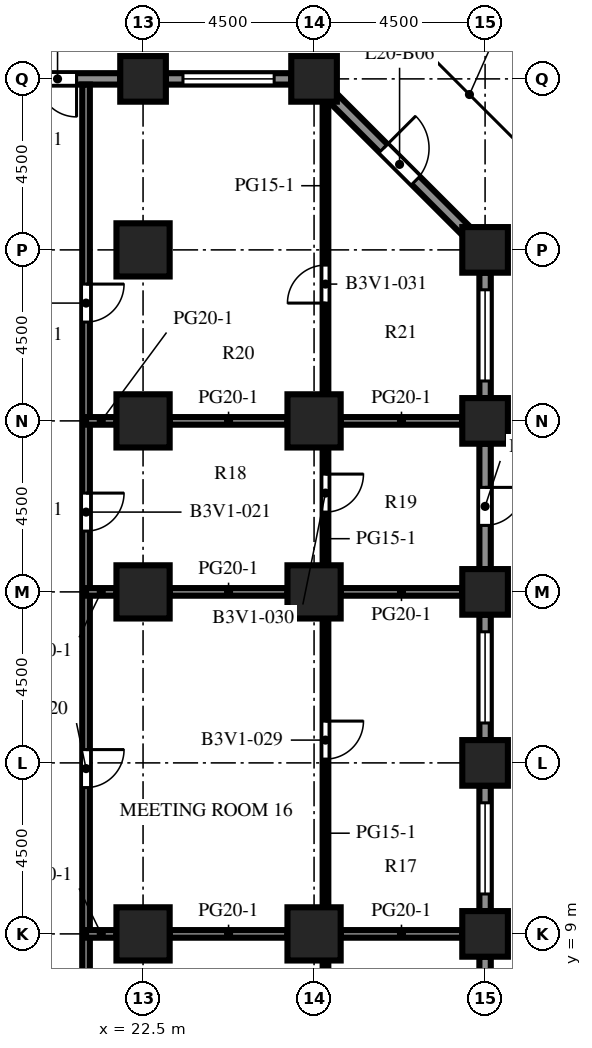
"""IFC4 building model, lengths in metres.
Left out: names, types, materials, properties, quantities, classifications, styles, units other than length and angle.
Written with IfcOpenShell. Run it as: python <this file> out.ifc"""

import sys

from ifc_helpers import new_model, si_unit, direction, frame, frame_2d, origin, origin_2d, place, context, subcontext, project, spatial, rectangle, extrude, element, fill, save


model = new_model("IFC4")
c1 = context("Model", 3, precision=1e-05, world=origin(), true_north=direction((0.0, 1.0)))
c2 = subcontext(c1, "Body", "Model", "MODEL_VIEW")
j1 = project(units=[si_unit("LENGTHUNIT", "METRE"), si_unit("PLANEANGLEUNIT", "RADIAN")], contexts=[c1])
p1 = place(None, origin())
s1 = spatial("IfcSite", under=j1, at=p1, CompositionType="ELEMENT")
p2 = place(p1, origin())
s2 = spatial("IfcBuilding", under=s1, at=p2, CompositionType="ELEMENT")
p3 = place(p2, frame((0.0, 0.0, 90.2)))
s3 = spatial("IfcBuildingStorey", under=s2, at=p3, CompositionType="ELEMENT", Elevation=90.2)
for number, where, z_axis, x_axis in (
    (1, (22.5, 31.5, 0.0), (0.0, 0.0, 1.0), (1.0, 0.0, 0.0)),
    (2, (27.0, 31.5, 0.0), (0.0, 0.0, 1.0), (1.0, 0.0, 0.0)),
    (3, (31.5, 9.0, 0.0), (0.0, 0.0, 1.0), (1.0, 0.0, 0.0)),
    (4, (31.5, 13.5, 0.0), (0.0, 0.0, 1.0), (1.0, 0.0, 0.0)),
    (5, (31.5, 18.0, 0.0), (0.0, 0.0, 1.0), (1.0, 0.0, 0.0)),
    (6, (31.5, 22.5, 0.0), (0.0, 0.0, 1.0), (1.0, 0.0, 0.0)),
    (7, (31.5, 27.0, 0.0), (0.0, 0.0, 1.0), (1.0, 0.0, 0.0)),
):
    element("IfcColumn", number, at=place(p3, frame(where, z_axis=z_axis, x_axis=x_axis)), inside=s3, PredefinedType="COLUMN", context=c2, shape_type="SweptSolid", body=[
        extrude(rectangle(XDim=1.2, YDim=1.2, at=origin_2d()), origin(), (0.0, 0.0, 1.0), 4.1),
    ])
for number, where, z_axis, x_axis in (
    (8, (22.5, 9.0, 0.0), (0.0, 0.0, 1.0), (1.0, 0.0, 0.0)),
    (9, (22.5, 18.0, 0.0), (0.0, 0.0, 1.0), (1.0, 0.0, 0.0)),
    (10, (22.5, 22.5, 0.0), (0.0, 0.0, 1.0), (1.0, 0.0, 0.0)),
    (11, (22.5, 27.0, 0.0), (0.0, 0.0, 1.0), (1.0, 0.0, 0.0)),
    (12, (27.0, 9.0, 0.0), (0.0, 0.0, 1.0), (1.0, 0.0, 0.0)),
    (13, (27.0, 18.0, 0.0), (0.0, 0.0, 1.0), (1.0, 0.0, 0.0)),
    (14, (27.0, 22.5, 0.0), (0.0, 0.0, 1.0), (1.0, 0.0, 0.0)),
):
    element("IfcColumn", number, at=place(p3, frame(where, z_axis=z_axis, x_axis=x_axis)), inside=s3, PredefinedType="COLUMN", context=c2, shape_type="SweptSolid", body=[
        extrude(rectangle(XDim=1.4, YDim=1.4, at=origin_2d()), origin(), (0.0, 0.0, 1.0), 4.1),
    ])
p4 = place(p3, frame((31.5, 8.4, 0.0), z_axis=(0.0, 0.0, 1.0), x_axis=(0.0, -1.0, 0.0)))
e15 = element("IfcWall", 15, at=p4, inside=s3, PredefinedType="SOLIDWALL", context=c2, shape_type="SweptSolid", body=[
    extrude(rectangle(XDim=3.3, YDim=0.3, at=frame_2d((1.65, 0.0))), origin(), (0.0, 0.0, 1.0), 2.75),
])
p5 = place(p4, frame((0.45, 0.0, 0.8)))
e16 = element("IfcOpeningElement", 16, at=p5, cuts=e15, PredefinedType="OPENING", context=c2, shape_type="SweptSolid", body=[
    extrude(rectangle(XDim=2.4, YDim=1.7, at=frame_2d((1.2, 0.85))), frame((0.0, 0.16, 0.0), z_axis=(0.0, -1.0, 0.0), x_axis=(1.0, 0.0, 0.0)), (0.0, 0.0, 1.0), 0.32),
])
p6 = place(p3, frame((31.5, 12.9, 0.0), z_axis=(0.0, 0.0, 1.0), x_axis=(0.0, -1.0, 0.0)))
e17 = element("IfcWall", 17, at=p6, inside=s3, PredefinedType="SOLIDWALL", context=c2, shape_type="SweptSolid", body=[
    extrude(rectangle(XDim=3.3, YDim=0.3, at=frame_2d((1.65, 0.0))), origin(), (0.0, 0.0, 1.0), 2.75),
])
p7 = place(p6, frame((0.45, 0.0, 0.8)))
e18 = element("IfcOpeningElement", 18, at=p7, cuts=e17, PredefinedType="OPENING", context=c2, shape_type="SweptSolid", body=[
    extrude(rectangle(XDim=2.4, YDim=1.7, at=frame_2d((1.2, 0.85))), frame((0.0, 0.16, 0.0), z_axis=(0.0, -1.0, 0.0), x_axis=(1.0, 0.0, 0.0)), (0.0, 0.0, 1.0), 0.32),
])
p8 = place(p3, frame((31.5, 17.4, 0.0), z_axis=(0.0, 0.0, 1.0), x_axis=(0.0, -1.0, 0.0)))
e19 = element("IfcWall", 19, at=p8, inside=s3, PredefinedType="SOLIDWALL", context=c2, shape_type="SweptSolid", body=[
    extrude(rectangle(XDim=3.3, YDim=0.3, at=frame_2d((1.65, 0.0))), origin(), (0.0, 0.0, 1.0), 2.75),
])
p9 = place(p8, frame((0.45, 0.0, 0.8)))
e20 = element("IfcOpeningElement", 20, at=p9, cuts=e19, PredefinedType="OPENING", context=c2, shape_type="SweptSolid", body=[
    extrude(rectangle(XDim=2.4, YDim=1.7, at=frame_2d((1.2, 0.85))), frame((0.0, 0.16, 0.0), z_axis=(0.0, -1.0, 0.0), x_axis=(1.0, 0.0, 0.0)), (0.0, 0.0, 1.0), 0.32),
])
p10 = place(p3, frame((31.5, 21.9, 0.0), z_axis=(0.0, 0.0, 1.0), x_axis=(0.0, -1.0, 0.0)))
e21 = element("IfcWall", 21, at=p10, inside=s3, PredefinedType="SOLIDWALL", context=c2, shape_type="SweptSolid", body=[
    extrude(rectangle(XDim=3.3, YDim=0.3, at=frame_2d((1.65, 0.0))), origin(), (0.0, 0.0, 1.0), 2.75),
])
p11 = place(p10, frame((1.15, 0.0, 0.0)))
e22 = element("IfcOpeningElement", 22, at=p11, cuts=e21, PredefinedType="OPENING", context=c2, shape_type="SweptSolid", body=[
    extrude(rectangle(XDim=1.0, YDim=2.2, at=frame_2d((0.5, 1.1))), frame((0.0, 0.16, 0.0), z_axis=(0.0, -1.0, 0.0), x_axis=(1.0, 0.0, 0.0)), (0.0, 0.0, 1.0), 0.32),
])
p12 = place(p3, frame((31.5, 26.4, 0.0), z_axis=(0.0, 0.0, 1.0), x_axis=(0.0, -1.0, 0.0)))
e23 = element("IfcWall", 23, at=p12, inside=s3, PredefinedType="SOLIDWALL", context=c2, shape_type="SweptSolid", body=[
    extrude(rectangle(XDim=3.3, YDim=0.3, at=frame_2d((1.65, 0.0))), origin(), (0.0, 0.0, 1.0), 2.75),
])
p13 = place(p12, frame((0.45, 0.0, 0.8)))
e24 = element("IfcOpeningElement", 24, at=p13, cuts=e23, PredefinedType="OPENING", context=c2, shape_type="SweptSolid", body=[
    extrude(rectangle(XDim=2.4, YDim=1.7, at=frame_2d((1.2, 0.85))), frame((0.0, 0.16, 0.0), z_axis=(0.0, -1.0, 0.0), x_axis=(1.0, 0.0, 0.0)), (0.0, 0.0, 1.0), 0.32),
])
p14 = place(p3, frame((27.494, 31.006, 0.0), z_axis=(0.0, 0.0, 1.0), x_axis=(0.707106781187, -0.707106781187, 0.0)))
e25 = element("IfcWall", 25, at=p14, inside=s3, PredefinedType="SOLIDWALL", context=c2, shape_type="SweptSolid", body=[
    extrude(rectangle(XDim=4.967, YDim=0.3, at=frame_2d((2.483, 0.0))), origin(), (0.0, 0.0, 1.0), 2.75),
])
p15 = place(p14, frame((1.884, 0.0, 0.0)))
e26 = element("IfcOpeningElement", 26, at=p15, cuts=e25, PredefinedType="OPENING", context=c2, shape_type="SweptSolid", body=[
    extrude(rectangle(XDim=1.2, YDim=2.2, at=frame_2d((0.6, 1.1))), frame((0.0, 0.16, 0.0), z_axis=(0.0, -1.0, 0.0), x_axis=(1.0, 0.0, 0.0)), (0.0, 0.0, 1.0), 0.32),
])
p16 = place(p3, frame((23.1, 31.5, 0.0), z_axis=(0.0, 0.0, 1.0), x_axis=(1.0, 0.0, 0.0)))
e27 = element("IfcWall", 27, at=p16, inside=s3, PredefinedType="SOLIDWALL", context=c2, shape_type="SweptSolid", body=[
    extrude(rectangle(XDim=3.3, YDim=0.3, at=frame_2d((1.65, 0.0))), origin(), (0.0, 0.0, 1.0), 2.75),
])
p17 = place(p16, frame((0.45, 0.0, 0.8)))
e28 = element("IfcOpeningElement", 28, at=p17, cuts=e27, PredefinedType="OPENING", context=c2, shape_type="SweptSolid", body=[
    extrude(rectangle(XDim=2.4, YDim=1.7, at=frame_2d((1.2, 0.85))), frame((0.0, 0.16, 0.0), z_axis=(0.0, -1.0, 0.0), x_axis=(1.0, 0.0, 0.0)), (0.0, 0.0, 1.0), 0.32),
])
p18 = place(p3, frame((18.6, 31.5, 0.0), z_axis=(0.0, 0.0, 1.0), x_axis=(1.0, 0.0, 0.0)))
e29 = element("IfcWall", 29, at=p18, inside=s3, PredefinedType="SOLIDWALL", context=c2, shape_type="SweptSolid", body=[
    extrude(rectangle(XDim=3.3, YDim=0.3, at=frame_2d((1.65, 0.0))), origin(), (0.0, 0.0, 1.0), 2.75),
])
p19 = place(p18, frame((1.15, 0.0, 0.0)))
e30 = element("IfcOpeningElement", 30, at=p19, cuts=e29, PredefinedType="OPENING", context=c2, shape_type="SweptSolid", body=[
    extrude(rectangle(XDim=1.0, YDim=2.2, at=frame_2d((0.5, 1.1))), frame((0.0, 0.16, 0.0), z_axis=(0.0, -1.0, 0.0), x_axis=(1.0, 0.0, 0.0)), (0.0, 0.0, 1.0), 0.32),
])
p20 = place(p3, frame((21.0, 31.35, 0.0), z_axis=(0.0, 0.0, 1.0), x_axis=(0.0, -1.0, 0.0)))
e31 = element("IfcWall", 31, at=p20, inside=s3, PredefinedType="PARTITIONING", context=c2, shape_type="SweptSolid", body=[
    extrude(rectangle(XDim=53.7, YDim=0.2, at=frame_2d((26.85, 0.0))), origin(), (0.0, 0.0, 1.0), 3.65),
])
p21 = place(p20, frame((47.5, 0.0, 0.0)))
e32 = element("IfcOpeningElement", 32, at=p21, cuts=e31, PredefinedType="OPENING", context=c2, shape_type="SweptSolid", body=[
    extrude(rectangle(XDim=1.0, YDim=2.1, at=frame_2d((0.5, 1.05))), frame((0.0, 0.11, 0.0), z_axis=(0.0, -1.0, 0.0), x_axis=(1.0, 0.0, 0.0)), (0.0, 0.0, 1.0), 0.22),
])
p22 = place(p20, frame((37.5, 0.0, 0.0)))
e33 = element("IfcOpeningElement", 33, at=p22, cuts=e31, PredefinedType="OPENING", context=c2, shape_type="SweptSolid", body=[
    extrude(rectangle(XDim=1.0, YDim=2.1, at=frame_2d((0.5, 1.05))), frame((0.0, 0.11, 0.0), z_axis=(0.0, -1.0, 0.0), x_axis=(1.0, 0.0, 0.0)), (0.0, 0.0, 1.0), 0.22),
])
p23 = place(p20, frame((27.25, 0.0, 0.0)))
e34 = element("IfcOpeningElement", 34, at=p23, cuts=e31, PredefinedType="OPENING", context=c2, shape_type="SweptSolid", body=[
    extrude(rectangle(XDim=1.0, YDim=2.1, at=frame_2d((0.5, 1.05))), frame((0.0, 0.11, 0.0), z_axis=(0.0, -1.0, 0.0), x_axis=(1.0, 0.0, 0.0)), (0.0, 0.0, 1.0), 0.22),
])
p24 = place(p20, frame((17.5, 0.0, 0.0)))
e35 = element("IfcOpeningElement", 35, at=p24, cuts=e31, PredefinedType="OPENING", context=c2, shape_type="SweptSolid", body=[
    extrude(rectangle(XDim=1.0, YDim=2.1, at=frame_2d((0.5, 1.05))), frame((0.0, 0.11, 0.0), z_axis=(0.0, -1.0, 0.0), x_axis=(1.0, 0.0, 0.0)), (0.0, 0.0, 1.0), 0.22),
])
p25 = place(p20, frame((10.75, 0.0, 0.0)))
e36 = element("IfcOpeningElement", 36, at=p25, cuts=e31, PredefinedType="OPENING", context=c2, shape_type="SweptSolid", body=[
    extrude(rectangle(XDim=1.0, YDim=2.1, at=frame_2d((0.5, 1.05))), frame((0.0, 0.11, 0.0), z_axis=(0.0, -1.0, 0.0), x_axis=(1.0, 0.0, 0.0)), (0.0, 0.0, 1.0), 0.22),
])
p26 = place(p20, frame((5.25, 0.0, 0.0)))
e37 = element("IfcOpeningElement", 37, at=p26, cuts=e31, PredefinedType="OPENING", context=c2, shape_type="SweptSolid", body=[
    extrude(rectangle(XDim=1.0, YDim=2.1, at=frame_2d((0.5, 1.05))), frame((0.0, 0.11, 0.0), z_axis=(0.0, -1.0, 0.0), x_axis=(1.0, 0.0, 0.0)), (0.0, 0.0, 1.0), 0.22),
])
p27 = place(p3, frame((27.3, 8.3, 0.0), z_axis=(0.0, 0.0, 1.0), x_axis=(0.0, -1.0, 0.0)))
e38 = element("IfcWall", 38, at=p27, inside=s3, PredefinedType="PARTITIONING", context=c2, shape_type="SweptSolid", body=[
    extrude(rectangle(XDim=7.6, YDim=0.15, at=frame_2d((3.8, 0.0))), origin(), (0.0, 0.0, 1.0), 3.65),
])
p28 = place(p27, frame((2.7, 0.0, 0.0)))
e39 = element("IfcOpeningElement", 39, at=p28, cuts=e38, PredefinedType="OPENING", context=c2, shape_type="SweptSolid", body=[
    extrude(rectangle(XDim=1.0, YDim=2.1, at=frame_2d((0.5, 1.05))), frame((0.0, 0.085, 0.0), z_axis=(0.0, -1.0, 0.0), x_axis=(1.0, 0.0, 0.0)), (0.0, 0.0, 1.0), 0.17),
])
p29 = place(p3, frame((27.3, 17.3, 0.0), z_axis=(0.0, 0.0, 1.0), x_axis=(0.0, -1.0, 0.0)))
e40 = element("IfcWall", 40, at=p29, inside=s3, PredefinedType="PARTITIONING", context=c2, shape_type="SweptSolid", body=[
    extrude(rectangle(XDim=7.6, YDim=0.15, at=frame_2d((3.8, 0.0))), origin(), (0.0, 0.0, 1.0), 3.65),
])
p30 = place(p29, frame((2.7, 0.0, 0.0)))
e41 = element("IfcOpeningElement", 41, at=p30, cuts=e40, PredefinedType="OPENING", context=c2, shape_type="SweptSolid", body=[
    extrude(rectangle(XDim=1.0, YDim=2.1, at=frame_2d((0.5, 1.05))), frame((0.0, 0.085, 0.0), z_axis=(0.0, -1.0, 0.0), x_axis=(1.0, 0.0, 0.0)), (0.0, 0.0, 1.0), 0.17),
])
p31 = place(p3, frame((27.3, 21.8, 0.0), z_axis=(0.0, 0.0, 1.0), x_axis=(0.0, -1.0, 0.0)))
e42 = element("IfcWall", 42, at=p31, inside=s3, PredefinedType="PARTITIONING", context=c2, shape_type="SweptSolid", body=[
    extrude(rectangle(XDim=3.1, YDim=0.15, at=frame_2d((1.55, 0.0))), origin(), (0.0, 0.0, 1.0), 3.65),
])
p32 = place(p31, frame((0.7, 0.0, 0.0)))
e43 = element("IfcOpeningElement", 43, at=p32, cuts=e42, PredefinedType="OPENING", context=c2, shape_type="SweptSolid", body=[
    extrude(rectangle(XDim=1.0, YDim=2.1, at=frame_2d((0.5, 1.05))), frame((0.0, 0.085, 0.0), z_axis=(0.0, -1.0, 0.0), x_axis=(1.0, 0.0, 0.0)), (0.0, 0.0, 1.0), 0.17),
])
p33 = place(p3, frame((27.3, 30.777, 0.0), z_axis=(0.0, 0.0, 1.0), x_axis=(0.0, -1.0, 0.0)))
e44 = element("IfcWall", 44, at=p33, inside=s3, PredefinedType="PARTITIONING", context=c2, shape_type="SweptSolid", body=[
    extrude(rectangle(XDim=7.577, YDim=0.15, at=frame_2d((3.789, 0.0))), origin(), (0.0, 0.0, 1.0), 3.65),
])
p34 = place(p33, frame((4.177, 0.0, 0.0)))
e45 = element("IfcOpeningElement", 45, at=p34, cuts=e44, PredefinedType="OPENING", context=c2, shape_type="SweptSolid", body=[
    extrude(rectangle(XDim=1.0, YDim=2.1, at=frame_2d((0.5, 1.05))), frame((0.0, 0.085, 0.0), z_axis=(0.0, -1.0, 0.0), x_axis=(1.0, 0.0, 0.0)), (0.0, 0.0, 1.0), 0.17),
])
p35 = place(p3, frame((21.0, 9.0, 0.0), z_axis=(0.0, 0.0, 1.0), x_axis=(1.0, 0.0, 0.0)))
e46 = element("IfcWall", 46, at=p35, inside=s3, PredefinedType="PARTITIONING", context=c2, shape_type="SweptSolid", body=[
    extrude(rectangle(XDim=0.8, YDim=0.2, at=frame_2d((0.4, 0.0))), origin(), (0.0, 0.0, 1.0), 3.65),
])
p36 = place(p3, frame((23.2, 9.0, 0.0), z_axis=(0.0, 0.0, 1.0), x_axis=(1.0, 0.0, 0.0)))
e47 = element("IfcWall", 47, at=p36, inside=s3, PredefinedType="PARTITIONING", context=c2, shape_type="SweptSolid", body=[
    extrude(rectangle(XDim=3.1, YDim=0.2, at=frame_2d((1.55, 0.0))), origin(), (0.0, 0.0, 1.0), 3.65),
])
p37 = place(p3, frame((27.7, 9.0, 0.0), z_axis=(0.0, 0.0, 1.0), x_axis=(1.0, 0.0, 0.0)))
e48 = element("IfcWall", 48, at=p37, inside=s3, PredefinedType="PARTITIONING", context=c2, shape_type="SweptSolid", body=[
    extrude(rectangle(XDim=3.2, YDim=0.2, at=frame_2d((1.6, 0.0))), origin(), (0.0, 0.0, 1.0), 3.65),
])
p38 = place(p3, frame((21.0, 18.0, 0.0), z_axis=(0.0, 0.0, 1.0), x_axis=(1.0, 0.0, 0.0)))
e49 = element("IfcWall", 49, at=p38, inside=s3, PredefinedType="PARTITIONING", context=c2, shape_type="SweptSolid", body=[
    extrude(rectangle(XDim=0.8, YDim=0.2, at=frame_2d((0.4, 0.0))), origin(), (0.0, 0.0, 1.0), 3.65),
])
p39 = place(p3, frame((23.2, 18.0, 0.0), z_axis=(0.0, 0.0, 1.0), x_axis=(1.0, 0.0, 0.0)))
e50 = element("IfcWall", 50, at=p39, inside=s3, PredefinedType="PARTITIONING", context=c2, shape_type="SweptSolid", body=[
    extrude(rectangle(XDim=3.1, YDim=0.2, at=frame_2d((1.55, 0.0))), origin(), (0.0, 0.0, 1.0), 3.65),
])
p40 = place(p3, frame((27.7, 18.0, 0.0), z_axis=(0.0, 0.0, 1.0), x_axis=(1.0, 0.0, 0.0)))
e51 = element("IfcWall", 51, at=p40, inside=s3, PredefinedType="PARTITIONING", context=c2, shape_type="SweptSolid", body=[
    extrude(rectangle(XDim=3.2, YDim=0.2, at=frame_2d((1.6, 0.0))), origin(), (0.0, 0.0, 1.0), 3.65),
])
p41 = place(p3, frame((21.0, 22.5, 0.0), z_axis=(0.0, 0.0, 1.0), x_axis=(1.0, 0.0, 0.0)))
e52 = element("IfcWall", 52, at=p41, inside=s3, PredefinedType="PARTITIONING", context=c2, shape_type="SweptSolid", body=[
    extrude(rectangle(XDim=0.8, YDim=0.2, at=frame_2d((0.4, 0.0))), origin(), (0.0, 0.0, 1.0), 3.65),
])
p42 = place(p3, frame((23.2, 22.5, 0.0), z_axis=(0.0, 0.0, 1.0), x_axis=(1.0, 0.0, 0.0)))
e53 = element("IfcWall", 53, at=p42, inside=s3, PredefinedType="PARTITIONING", context=c2, shape_type="SweptSolid", body=[
    extrude(rectangle(XDim=3.1, YDim=0.2, at=frame_2d((1.55, 0.0))), origin(), (0.0, 0.0, 1.0), 3.65),
])
p43 = place(p3, frame((27.7, 22.5, 0.0), z_axis=(0.0, 0.0, 1.0), x_axis=(1.0, 0.0, 0.0)))
e54 = element("IfcWall", 54, at=p43, inside=s3, PredefinedType="PARTITIONING", context=c2, shape_type="SweptSolid", body=[
    extrude(rectangle(XDim=3.2, YDim=0.2, at=frame_2d((1.6, 0.0))), origin(), (0.0, 0.0, 1.0), 3.65),
])
p44 = place(p7, origin())
e55 = element("IfcWindow", 55, at=p44, inside=s3, PartitioningType="SINGLE_PANEL", PredefinedType="WINDOW", context=c2, shape_type="SweptSolid", body=[
    extrude(rectangle(XDim=2.4, YDim=1.7, at=frame_2d((1.2, 0.85))), frame((0.0, 0.03, 0.0), z_axis=(0.0, -1.0, 0.0), x_axis=(1.0, 0.0, 0.0)), (0.0, 0.0, 1.0), 0.06),
])
fill(e18, e55)
p45 = place(p9, origin())
e56 = element("IfcWindow", 56, at=p45, inside=s3, PartitioningType="SINGLE_PANEL", PredefinedType="WINDOW", context=c2, shape_type="SweptSolid", body=[
    extrude(rectangle(XDim=2.4, YDim=1.7, at=frame_2d((1.2, 0.85))), frame((0.0, 0.03, 0.0), z_axis=(0.0, -1.0, 0.0), x_axis=(1.0, 0.0, 0.0)), (0.0, 0.0, 1.0), 0.06),
])
fill(e20, e56)
p46 = place(p11, origin())
e57 = element("IfcDoor", 57, at=p46, inside=s3, OperationType="SINGLE_SWING_LEFT", PredefinedType="DOOR", context=c2, shape_type="SweptSolid", body=[
    extrude(rectangle(XDim=1.0, YDim=2.2, at=frame_2d((0.5, 1.1))), frame((0.0, 0.025, 0.0), z_axis=(0.0, -1.0, 0.0), x_axis=(1.0, 0.0, 0.0)), (0.0, 0.0, 1.0), 0.05),
])
fill(e22, e57)
p47 = place(p13, origin())
e58 = element("IfcWindow", 58, at=p47, inside=s3, PartitioningType="SINGLE_PANEL", PredefinedType="WINDOW", context=c2, shape_type="SweptSolid", body=[
    extrude(rectangle(XDim=2.4, YDim=1.7, at=frame_2d((1.2, 0.85))), frame((0.0, 0.03, 0.0), z_axis=(0.0, -1.0, 0.0), x_axis=(1.0, 0.0, 0.0)), (0.0, 0.0, 1.0), 0.06),
])
fill(e24, e58)
p48 = place(p15, origin())
e59 = element("IfcDoor", 59, at=p48, inside=s3, OperationType="SINGLE_SWING_LEFT", PredefinedType="DOOR", context=c2, shape_type="SweptSolid", body=[
    extrude(rectangle(XDim=1.2, YDim=2.2, at=frame_2d((0.6, 1.1))), frame((0.0, 0.025, 0.0), z_axis=(0.0, -1.0, 0.0), x_axis=(1.0, 0.0, 0.0)), (0.0, 0.0, 1.0), 0.05),
])
fill(e26, e59)
p49 = place(p17, origin())
e60 = element("IfcWindow", 60, at=p49, inside=s3, PartitioningType="SINGLE_PANEL", PredefinedType="WINDOW", context=c2, shape_type="SweptSolid", body=[
    extrude(rectangle(XDim=2.4, YDim=1.7, at=frame_2d((1.2, 0.85))), frame((0.0, 0.03, 0.0), z_axis=(0.0, -1.0, 0.0), x_axis=(1.0, 0.0, 0.0)), (0.0, 0.0, 1.0), 0.06),
])
fill(e28, e60)
p50 = place(p19, origin())
e61 = element("IfcDoor", 61, at=p50, inside=s3, OperationType="SINGLE_SWING_RIGHT", PredefinedType="DOOR", context=c2, shape_type="SweptSolid", body=[
    extrude(rectangle(XDim=1.0, YDim=2.2, at=frame_2d((0.5, 1.1))), frame((0.0, 0.025, 0.0), z_axis=(0.0, -1.0, 0.0), x_axis=(1.0, 0.0, 0.0)), (0.0, 0.0, 1.0), 0.05),
])
fill(e30, e61)
p51 = place(p24, origin())
e62 = element("IfcDoor", 62, at=p51, inside=s3, OperationType="SINGLE_SWING_LEFT", PredefinedType="DOOR", context=c2, shape_type="SweptSolid", body=[
    extrude(rectangle(XDim=1.0, YDim=2.1, at=frame_2d((0.5, 1.05))), frame((0.0, 0.025, 0.0), z_axis=(0.0, -1.0, 0.0), x_axis=(1.0, 0.0, 0.0)), (0.0, 0.0, 1.0), 0.05),
])
fill(e35, e62)
p52 = place(p25, origin())
e63 = element("IfcDoor", 63, at=p52, inside=s3, OperationType="SINGLE_SWING_LEFT", PredefinedType="DOOR", context=c2, shape_type="SweptSolid", body=[
    extrude(rectangle(XDim=1.0, YDim=2.1, at=frame_2d((0.5, 1.05))), frame((0.0, 0.025, 0.0), z_axis=(0.0, -1.0, 0.0), x_axis=(1.0, 0.0, 0.0)), (0.0, 0.0, 1.0), 0.05),
])
fill(e36, e63)
p53 = place(p26, origin())
e64 = element("IfcDoor", 64, at=p53, inside=s3, OperationType="SINGLE_SWING_LEFT", PredefinedType="DOOR", context=c2, shape_type="SweptSolid", body=[
    extrude(rectangle(XDim=1.0, YDim=2.1, at=frame_2d((0.5, 1.05))), frame((0.0, 0.025, 0.0), z_axis=(0.0, -1.0, 0.0), x_axis=(1.0, 0.0, 0.0)), (0.0, 0.0, 1.0), 0.05),
])
fill(e37, e64)
p54 = place(p30, origin())
e65 = element("IfcDoor", 65, at=p54, inside=s3, OperationType="SINGLE_SWING_LEFT", PredefinedType="DOOR", context=c2, shape_type="SweptSolid", body=[
    extrude(rectangle(XDim=1.0, YDim=2.1, at=frame_2d((0.5, 1.05))), frame((0.0, 0.025, 0.0), z_axis=(0.0, -1.0, 0.0), x_axis=(1.0, 0.0, 0.0)), (0.0, 0.0, 1.0), 0.05),
])
fill(e41, e65)
p55 = place(p32, origin())
e66 = element("IfcDoor", 66, at=p55, inside=s3, OperationType="SINGLE_SWING_LEFT", PredefinedType="DOOR", context=c2, shape_type="SweptSolid", body=[
    extrude(rectangle(XDim=1.0, YDim=2.1, at=frame_2d((0.5, 1.05))), frame((0.0, 0.025, 0.0), z_axis=(0.0, -1.0, 0.0), x_axis=(1.0, 0.0, 0.0)), (0.0, 0.0, 1.0), 0.05),
])
fill(e43, e66)
p56 = place(p34, origin())
e67 = element("IfcDoor", 67, at=p56, inside=s3, OperationType="SINGLE_SWING_RIGHT", PredefinedType="DOOR", context=c2, shape_type="SweptSolid", body=[
    extrude(rectangle(XDim=1.0, YDim=2.1, at=frame_2d((0.5, 1.05))), frame((0.0, 0.025, 0.0), z_axis=(0.0, -1.0, 0.0), x_axis=(1.0, 0.0, 0.0)), (0.0, 0.0, 1.0), 0.05),
])
fill(e45, e67)
save(model, sys.argv[1])
